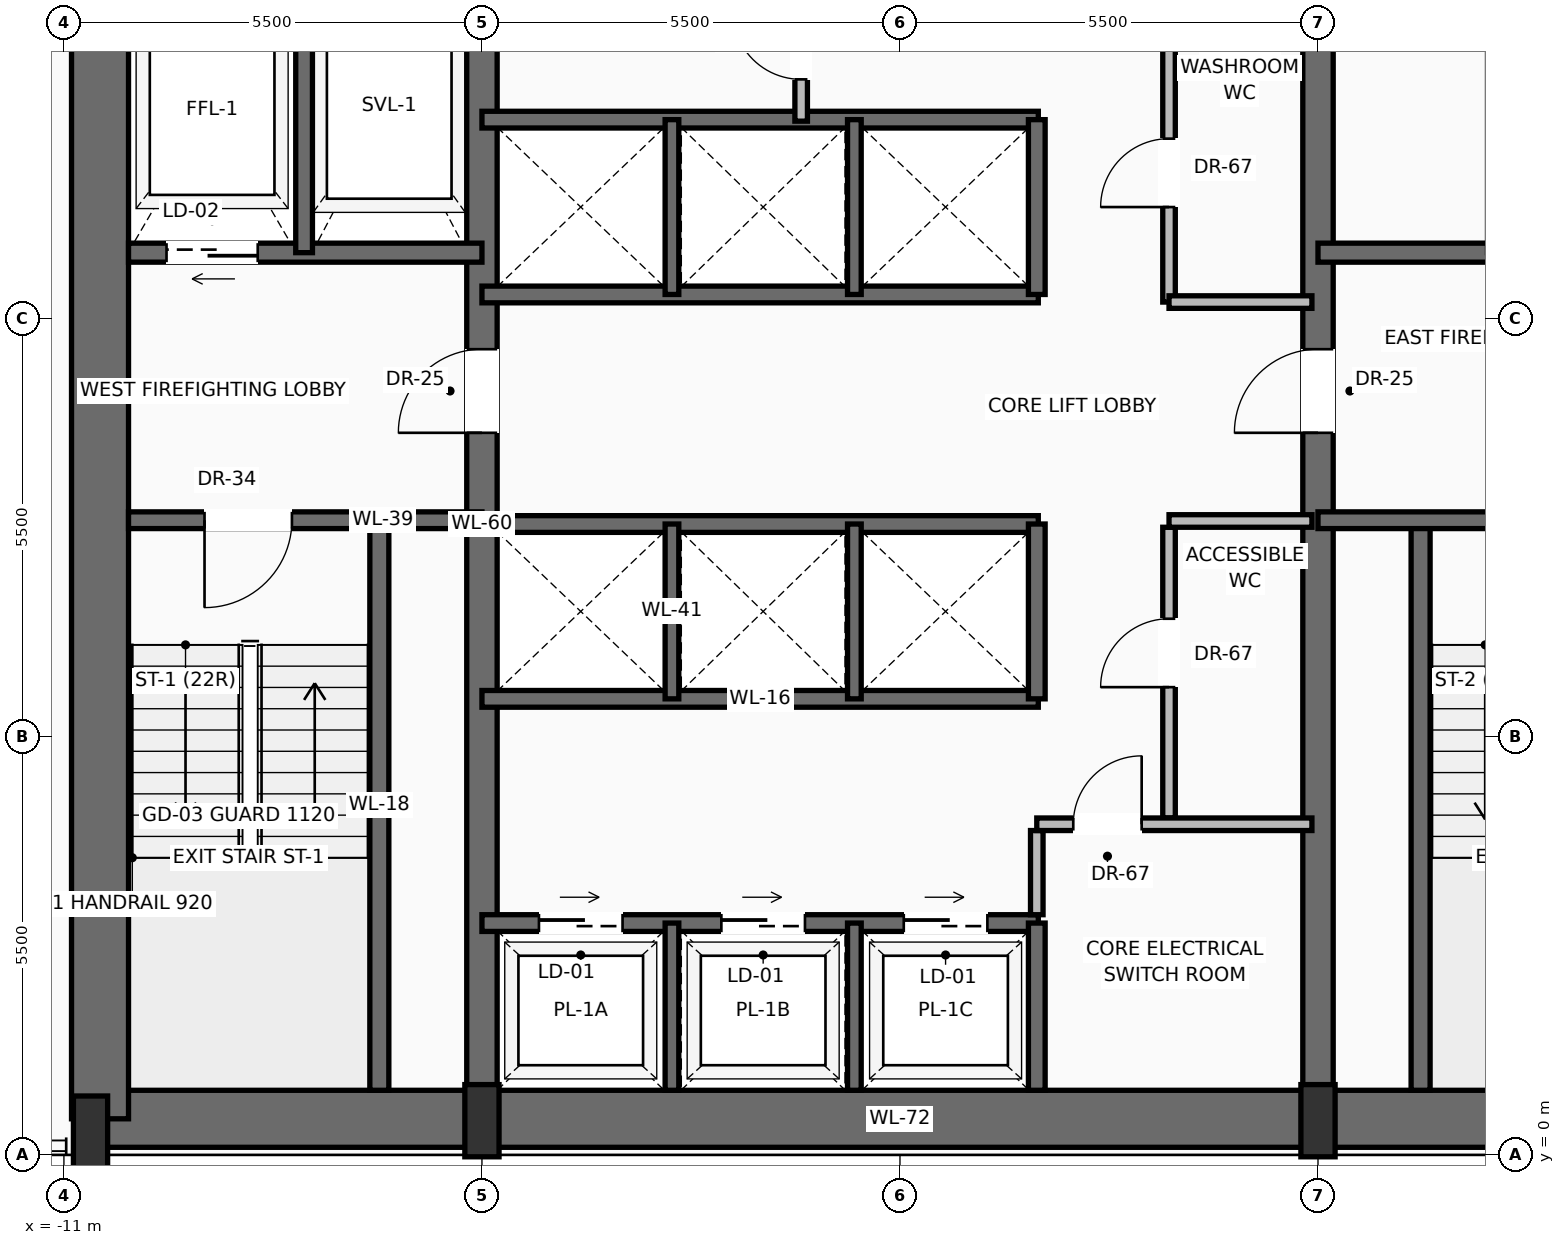
"""IFC4 building model, lengths in metres.
Left out: names, types, materials, properties, quantities, classifications, styles, units other than length and angle.
Written with IfcOpenShell. Run it as: python <this file> out.ifc"""

import sys

from ifc_helpers import new_model, si_unit, direction, frame, frame_2d, origin, origin_2d, place, context, subcontext, project, spatial, rectangle, extrude, source, transform, mapped, element, fill, save


model = new_model("IFC4")
c1 = context("Model", 3, precision=1e-05, world=origin(), true_north=direction((0.0, 1.0)))
c2 = subcontext(c1, "Body", "Model", "MODEL_VIEW")
j1 = project(units=[si_unit("LENGTHUNIT", "METRE"), si_unit("PLANEANGLEUNIT", "RADIAN")], contexts=[c1])
p1 = place(None, origin())
s1 = spatial("IfcSite", under=j1, at=p1, CompositionType="ELEMENT")
p2 = place(p1, origin())
s2 = spatial("IfcBuilding", under=s1, at=p2, CompositionType="ELEMENT")
p3 = place(p2, frame((0.0, 0.0, 109.9)))
s3 = spatial("IfcBuildingStorey", under=s2, at=p3, CompositionType="ELEMENT", Elevation=109.9)
p4 = place(p3, frame((-10.65, 0.475, 0.0), z_axis=(0.0, 0.0, 1.0), x_axis=(1.0, 0.0, 0.0)))
e1 = element("IfcWall", 1, at=p4, inside=s3, PredefinedType="SHEAR", context=c2, shape_type="SweptSolid", body=[
    extrude(rectangle(XDim=21.3, YDim=0.75, at=frame_2d((10.65, 0.0))), origin(), (0.0, 0.0, 1.0), 3.45),
])
p5 = place(p3, frame((-10.525, 0.475, 0.0), z_axis=(0.0, 0.0, 1.0), x_axis=(0.0, 1.0, 0.0)))
e2 = element("IfcWall", 2, at=p5, inside=s3, PredefinedType="SHEAR", context=c2, shape_type="SweptSolid", body=[
    extrude(rectangle(XDim=15.65, YDim=0.75, at=frame_2d((7.825, 0.0))), origin(), (0.0, 0.0, 1.0), 3.45),
])
p6 = place(p3, frame((-5.5, 0.475, 0.0), z_axis=(0.0, 0.0, 1.0), x_axis=(0.0, 1.0, 0.0)))
e3 = element("IfcWall", 3, at=p6, inside=s3, PredefinedType="SHEAR", context=c2, shape_type="SweptSolid", body=[
    extrude(rectangle(XDim=15.65, YDim=0.4, at=frame_2d((7.825, 0.0))), origin(), (0.0, 0.0, 1.0), 3.45),
])
p7 = place(p6, frame((9.025, 0.0, 0.0)))
e4 = element("IfcOpeningElement", 4, at=p7, cuts=e3, PredefinedType="OPENING", context=c2, shape_type="SweptSolid", body=[
    extrude(rectangle(XDim=1.1, YDim=2.2, at=frame_2d((0.55, 1.1))), frame((0.0, 0.21, 0.0), z_axis=(0.0, -1.0, 0.0), x_axis=(1.0, 0.0, 0.0)), (0.0, 0.0, 1.0), 0.42),
])
p8 = place(p3, frame((5.5, 0.475, 0.0), z_axis=(0.0, 0.0, 1.0), x_axis=(0.0, 1.0, 0.0)))
e5 = element("IfcWall", 5, at=p8, inside=s3, PredefinedType="SHEAR", context=c2, shape_type="SweptSolid", body=[
    extrude(rectangle(XDim=15.65, YDim=0.4, at=frame_2d((7.825, 0.0))), origin(), (0.0, 0.0, 1.0), 3.45),
])
p9 = place(p8, frame((9.025, 0.0, 0.0)))
e6 = element("IfcOpeningElement", 6, at=p9, cuts=e5, PredefinedType="OPENING", context=c2, shape_type="SweptSolid", body=[
    extrude(rectangle(XDim=1.1, YDim=2.2, at=frame_2d((0.55, 1.1))), frame((0.0, 0.21, 0.0), z_axis=(0.0, -1.0, 0.0), x_axis=(1.0, 0.0, 0.0)), (0.0, 0.0, 1.0), 0.42),
])
m1 = source(origin(), c2, "Body", "SweptSolid", [
    extrude(rectangle(XDim=0.45, YDim=0.95, at=origin_2d()), origin(), (0.0, 0.0, 1.0), 3.7),
])
for number, where, z_axis, x_axis in (
    (7, (-10.65, 0.3, 0.0), (0.0, 0.0, 1.0), (1.0, 0.0, 0.0)),
    (8, (-5.5, 0.45, 0.0), (0.0, 0.0, 1.0), (1.0, 0.0, 0.0)),
    (9, (5.5, 0.45, 0.0), (0.0, 0.0, 1.0), (1.0, 0.0, 0.0)),
):
    element("IfcColumn", number, at=place(p3, frame(where, z_axis=z_axis, x_axis=x_axis)), inside=s3, PredefinedType="PILASTER", context=c2, shape_type="MappedRepresentation", body=[
        mapped(m1, transform((0.0, 0.0, 0.0), scale=1.0)),
    ])
p10 = place(p3, frame((-6.85, 0.85, 0.0), z_axis=(0.0, 0.0, 1.0), x_axis=(0.0, 1.0, 0.0)))
e10 = element("IfcWall", 10, at=p10, inside=s3, PredefinedType="SOLIDWALL", context=c2, shape_type="SweptSolid", body=[
    extrude(rectangle(XDim=7.5, YDim=0.25, at=frame_2d((3.75, 0.0))), origin(), (0.0, 0.0, 1.0), 3.45),
])
p11 = place(p3, frame((-5.5, 8.35, 0.0), z_axis=(0.0, 0.0, 1.0), x_axis=(-1.0, 0.0, 0.0)))
e11 = element("IfcWall", 11, at=p11, inside=s3, PredefinedType="SOLIDWALL", context=c2, shape_type="SweptSolid", body=[
    extrude(rectangle(XDim=4.65, YDim=0.22, at=frame_2d((2.325, 0.0))), origin(), (0.0, 0.0, 1.0), 3.45),
])
p12 = place(p11, frame((2.5, 0.0, 0.0)))
e12 = element("IfcOpeningElement", 12, at=p12, cuts=e11, PredefinedType="OPENING", context=c2, shape_type="SweptSolid", body=[
    extrude(rectangle(XDim=1.15, YDim=2.2, at=frame_2d((0.575, 1.1))), frame((0.0, 0.12, 0.0), z_axis=(0.0, -1.0, 0.0), x_axis=(1.0, 0.0, 0.0)), (0.0, 0.0, 1.0), 0.24),
])
p13 = place(p3, frame((-5.5, 11.87, 0.0), z_axis=(0.0, 0.0, 1.0), x_axis=(-1.0, 0.0, 0.0)))
e13 = element("IfcWall", 13, at=p13, inside=s3, PredefinedType="SOLIDWALL", context=c2, shape_type="SweptSolid", body=[
    extrude(rectangle(XDim=4.65, YDim=0.25, at=frame_2d((2.325, 0.0))), origin(), (0.0, 0.0, 1.0), 3.45),
])
p14 = place(p13, frame((2.95, 0.0, 0.0)))
e14 = element("IfcOpeningElement", 14, at=p14, cuts=e13, PredefinedType="OPENING", context=c2, shape_type="SweptSolid", body=[
    extrude(rectangle(XDim=1.2, YDim=2.25, at=frame_2d((0.6, 1.125))), frame((0.0, 0.135, 0.0), z_axis=(0.0, -1.0, 0.0), x_axis=(1.0, 0.0, 0.0)), (0.0, 0.0, 1.0), 0.27),
])
p15 = place(p3, frame((-7.84, 11.87, 0.0), z_axis=(0.0, 0.0, 1.0), x_axis=(0.0, 1.0, 0.0)))
e15 = element("IfcWall", 15, at=p15, inside=s3, PredefinedType="SOLIDWALL", context=c2, shape_type="SweptSolid", body=[
    extrude(rectangle(XDim=3.88, YDim=0.22, at=frame_2d((1.94, 0.0))), origin(), (0.0, 0.0, 1.0), 3.45),
])
p16 = place(p3, frame((6.85, 0.85, 0.0), z_axis=(0.0, 0.0, 1.0), x_axis=(0.0, 1.0, 0.0)))
e16 = element("IfcWall", 16, at=p16, inside=s3, PredefinedType="SOLIDWALL", context=c2, shape_type="SweptSolid", body=[
    extrude(rectangle(XDim=7.5, YDim=0.25, at=frame_2d((3.75, 0.0))), origin(), (0.0, 0.0, 1.0), 3.45),
])
p17 = place(p3, frame((10.15, 8.35, 0.0), z_axis=(0.0, 0.0, 1.0), x_axis=(-1.0, 0.0, 0.0)))
e17 = element("IfcWall", 17, at=p17, inside=s3, PredefinedType="SOLIDWALL", context=c2, shape_type="SweptSolid", body=[
    extrude(rectangle(XDim=4.65, YDim=0.22, at=frame_2d((2.325, 0.0))), origin(), (0.0, 0.0, 1.0), 3.45),
])
p18 = place(p17, frame((1.0, 0.0, 0.0)))
e18 = element("IfcOpeningElement", 18, at=p18, cuts=e17, PredefinedType="OPENING", context=c2, shape_type="SweptSolid", body=[
    extrude(rectangle(XDim=1.15, YDim=2.2, at=frame_2d((0.575, 1.1))), frame((0.0, 0.12, 0.0), z_axis=(0.0, -1.0, 0.0), x_axis=(1.0, 0.0, 0.0)), (0.0, 0.0, 1.0), 0.24),
])
p19 = place(p3, frame((10.15, 11.87, 0.0), z_axis=(0.0, 0.0, 1.0), x_axis=(-1.0, 0.0, 0.0)))
e19 = element("IfcWall", 19, at=p19, inside=s3, PredefinedType="SOLIDWALL", context=c2, shape_type="SweptSolid", body=[
    extrude(rectangle(XDim=4.65, YDim=0.25, at=frame_2d((2.325, 0.0))), origin(), (0.0, 0.0, 1.0), 3.45),
])
p20 = place(p19, frame((0.5, 0.0, 0.0)))
e20 = element("IfcOpeningElement", 20, at=p20, cuts=e19, PredefinedType="OPENING", context=c2, shape_type="SweptSolid", body=[
    extrude(rectangle(XDim=1.2, YDim=2.25, at=frame_2d((0.6, 1.125))), frame((0.0, 0.135, 0.0), z_axis=(0.0, -1.0, 0.0), x_axis=(1.0, 0.0, 0.0)), (0.0, 0.0, 1.0), 0.27),
])
p21 = place(p3, frame((-5.5, 3.05, 0.0), z_axis=(0.0, 0.0, 1.0), x_axis=(1.0, 0.0, 0.0)))
e21 = element("IfcWall", 21, at=p21, inside=s3, PredefinedType="SOLIDWALL", context=c2, shape_type="SweptSolid", body=[
    extrude(rectangle(XDim=7.32, YDim=0.22, at=frame_2d((3.66, 0.0))), origin(), (0.0, 0.0, 1.0), 3.45),
])
p22 = place(p21, frame((0.75, 0.0, 0.0)))
e22 = element("IfcOpeningElement", 22, at=p22, cuts=e21, PredefinedType="OPENING", context=c2, shape_type="SweptSolid", body=[
    extrude(rectangle(XDim=1.1, YDim=2.2, at=frame_2d((0.55, 1.1))), frame((0.0, 0.12, 0.0), z_axis=(0.0, -1.0, 0.0), x_axis=(1.0, 0.0, 0.0)), (0.0, 0.0, 1.0), 0.24),
])
p23 = place(p21, frame((3.15, 0.0, 0.0)))
e23 = element("IfcOpeningElement", 23, at=p23, cuts=e21, PredefinedType="OPENING", context=c2, shape_type="SweptSolid", body=[
    extrude(rectangle(XDim=1.1, YDim=2.2, at=frame_2d((0.55, 1.1))), frame((0.0, 0.12, 0.0), z_axis=(0.0, -1.0, 0.0), x_axis=(1.0, 0.0, 0.0)), (0.0, 0.0, 1.0), 0.24),
])
p24 = place(p21, frame((5.55, 0.0, 0.0)))
e24 = element("IfcOpeningElement", 24, at=p24, cuts=e21, PredefinedType="OPENING", context=c2, shape_type="SweptSolid", body=[
    extrude(rectangle(XDim=1.1, YDim=2.2, at=frame_2d((0.55, 1.1))), frame((0.0, 0.12, 0.0), z_axis=(0.0, -1.0, 0.0), x_axis=(1.0, 0.0, 0.0)), (0.0, 0.0, 1.0), 0.24),
])
p25 = place(p3, frame((1.8, 0.85, 0.0), z_axis=(0.0, 0.0, 1.0), x_axis=(0.0, 1.0, 0.0)))
e25 = element("IfcWall", 25, at=p25, inside=s3, PredefinedType="SOLIDWALL", context=c2, shape_type="SweptSolid", body=[
    extrude(rectangle(XDim=2.2, YDim=0.22, at=frame_2d((1.1, 0.0))), origin(), (0.0, 0.0, 1.0), 3.45),
])
for number, where, z_axis, x_axis in (
    (26, (-3.0, 0.85, 0.0), (0.0, 0.0, 1.0), (0.0, 1.0, 0.0)),
    (27, (-0.6, 0.85, 0.0), (0.0, 0.0, 1.0), (0.0, 1.0, 0.0)),
):
    element("IfcWall", number, at=place(p3, frame(where, z_axis=z_axis, x_axis=x_axis)), inside=s3, PredefinedType="SOLIDWALL", context=c2, shape_type="SweptSolid", body=[
        extrude(rectangle(XDim=2.2, YDim=0.18, at=frame_2d((1.1, 0.0))), origin(), (0.0, 0.0, 1.0), 3.45),
    ])
p26 = place(p3, frame((1.8, 3.16, 0.0), z_axis=(0.0, 0.0, 1.0), x_axis=(0.0, 1.0, 0.0)))
e28 = element("IfcWall", 28, at=p26, inside=s3, PredefinedType="PARTITIONING", context=c2, shape_type="SweptSolid", body=[
    extrude(rectangle(XDim=1.108, YDim=0.165, at=frame_2d((0.554, 0.0))), origin(), (0.0, 0.0, 1.0), 3.442),
])
p27 = place(p3, frame((3.54, 4.433, 0.0), z_axis=(0.0, 0.0, 1.0), x_axis=(0.0, 1.0, 0.0)))
e29 = element("IfcWall", 29, at=p27, inside=s3, PredefinedType="PARTITIONING", context=c2, shape_type="SweptSolid", body=[
    extrude(rectangle(XDim=3.825, YDim=0.165, at=frame_2d((1.913, 0.0))), origin(), (0.0, 0.0, 1.0), 3.442),
])
p28 = place(p27, frame((1.721, 0.0, 0.0)))
e30 = element("IfcOpeningElement", 30, at=p28, cuts=e29, PredefinedType="OPENING", context=c2, shape_type="SweptSolid", body=[
    extrude(rectangle(XDim=0.9, YDim=2.1, at=frame_2d((0.45, 1.05))), frame((0.0, 0.093, 0.0), z_axis=(0.0, -1.0, 0.0), x_axis=(1.0, 0.0, 0.0)), (0.0, 0.0, 1.0), 0.185),
])
p29 = place(p3, frame((3.54, 8.34, 0.0), z_axis=(0.0, 0.0, 1.0), x_axis=(1.0, 0.0, 0.0)))
e31 = element("IfcWall", 31, at=p29, inside=s3, PredefinedType="PARTITIONING", context=c2, shape_type="SweptSolid", body=[
    extrude(rectangle(XDim=1.88, YDim=0.165, at=frame_2d((0.94, 0.0))), origin(), (0.0, 0.0, 1.0), 3.442),
])
p30 = place(p3, frame((1.8, 4.35, 0.0), z_axis=(0.0, 0.0, 1.0), x_axis=(1.0, 0.0, 0.0)))
e32 = element("IfcWall", 32, at=p30, inside=s3, PredefinedType="PARTITIONING", context=c2, shape_type="SweptSolid", body=[
    extrude(rectangle(XDim=3.62, YDim=0.165, at=frame_2d((1.81, 0.0))), origin(), (0.0, 0.0, 1.0), 3.442),
])
p31 = place(p30, frame((0.48, 0.0, 0.0)))
e33 = element("IfcOpeningElement", 33, at=p31, cuts=e32, PredefinedType="OPENING", context=c2, shape_type="SweptSolid", body=[
    extrude(rectangle(XDim=0.9, YDim=2.1, at=frame_2d((0.45, 1.05))), frame((0.0, 0.093, 0.0), z_axis=(0.0, -1.0, 0.0), x_axis=(1.0, 0.0, 0.0)), (0.0, 0.0, 1.0), 0.185),
])
for number, where, z_axis, x_axis in (
    (34, (-5.5, 6.0, 0.0), (0.0, 0.0, 1.0), (1.0, 0.0, 0.0)),
    (35, (-5.5, 8.3, 0.0), (0.0, 0.0, 1.0), (1.0, 0.0, 0.0)),
):
    element("IfcWall", number, at=place(p3, frame(where, z_axis=z_axis, x_axis=x_axis)), inside=s3, PredefinedType="SOLIDWALL", context=c2, shape_type="SweptSolid", body=[
        extrude(rectangle(XDim=7.32, YDim=0.22, at=frame_2d((3.66, 0.0))), origin(), (0.0, 0.0, 1.0), 3.45),
    ])
p32 = place(p3, frame((1.8, 6.0, 0.0), z_axis=(0.0, 0.0, 1.0), x_axis=(0.0, 1.0, 0.0)))
e36 = element("IfcWall", 36, at=p32, inside=s3, PredefinedType="SOLIDWALL", context=c2, shape_type="SweptSolid", body=[
    extrude(rectangle(XDim=2.3, YDim=0.22, at=frame_2d((1.15, 0.0))), origin(), (0.0, 0.0, 1.0), 3.45),
])
for number, where, z_axis, x_axis in (
    (37, (-3.0, 6.0, 0.0), (0.0, 0.0, 1.0), (0.0, 1.0, 0.0)),
    (38, (-0.6, 6.0, 0.0), (0.0, 0.0, 1.0), (0.0, 1.0, 0.0)),
):
    element("IfcWall", number, at=place(p3, frame(where, z_axis=z_axis, x_axis=x_axis)), inside=s3, PredefinedType="SOLIDWALL", context=c2, shape_type="SweptSolid", body=[
        extrude(rectangle(XDim=2.3, YDim=0.18, at=frame_2d((1.15, 0.0))), origin(), (0.0, 0.0, 1.0), 3.45),
    ])
for number, where, z_axis, x_axis in (
    (39, (-5.5, 11.32, 0.0), (0.0, 0.0, 1.0), (1.0, 0.0, 0.0)),
    (40, (-5.5, 13.62, 0.0), (0.0, 0.0, 1.0), (1.0, 0.0, 0.0)),
):
    element("IfcWall", number, at=place(p3, frame(where, z_axis=z_axis, x_axis=x_axis)), inside=s3, PredefinedType="SOLIDWALL", context=c2, shape_type="SweptSolid", body=[
        extrude(rectangle(XDim=7.32, YDim=0.22, at=frame_2d((3.66, 0.0))), origin(), (0.0, 0.0, 1.0), 3.45),
    ])
p33 = place(p3, frame((1.8, 11.32, 0.0), z_axis=(0.0, 0.0, 1.0), x_axis=(0.0, 1.0, 0.0)))
e41 = element("IfcWall", 41, at=p33, inside=s3, PredefinedType="SOLIDWALL", context=c2, shape_type="SweptSolid", body=[
    extrude(rectangle(XDim=2.3, YDim=0.22, at=frame_2d((1.15, 0.0))), origin(), (0.0, 0.0, 1.0), 3.45),
])
for number, where, z_axis, x_axis in (
    (42, (-3.0, 11.32, 0.0), (0.0, 0.0, 1.0), (0.0, 1.0, 0.0)),
    (43, (-0.6, 11.32, 0.0), (0.0, 0.0, 1.0), (0.0, 1.0, 0.0)),
):
    element("IfcWall", number, at=place(p3, frame(where, z_axis=z_axis, x_axis=x_axis)), inside=s3, PredefinedType="SOLIDWALL", context=c2, shape_type="SweptSolid", body=[
        extrude(rectangle(XDim=2.3, YDim=0.18, at=frame_2d((1.15, 0.0))), origin(), (0.0, 0.0, 1.0), 3.45),
    ])
p34 = place(p3, frame((-1.3, 13.6, 0.0), z_axis=(0.0, 0.0, 1.0), x_axis=(0.0, 1.0, 0.0)))
e44 = element("IfcWall", 44, at=p34, inside=s3, PredefinedType="PARTITIONING", context=c2, shape_type="SweptSolid", body=[
    extrude(rectangle(XDim=2.15, YDim=0.165, at=frame_2d((1.075, 0.0))), origin(), (0.0, 0.0, 1.0), 3.442),
])
p35 = place(p34, frame((0.55, 0.0, 0.0)))
e45 = element("IfcOpeningElement", 45, at=p35, cuts=e44, PredefinedType="OPENING", context=c2, shape_type="SweptSolid", body=[
    extrude(rectangle(XDim=0.9, YDim=2.1, at=frame_2d((0.45, 1.05))), frame((0.0, 0.093, 0.0), z_axis=(0.0, -1.0, 0.0), x_axis=(1.0, 0.0, 0.0)), (0.0, 0.0, 1.0), 0.185),
])
p36 = place(p3, frame((3.54, 11.22, 0.0), z_axis=(0.0, 0.0, 1.0), x_axis=(0.0, 1.0, 0.0)))
e46 = element("IfcWall", 46, at=p36, inside=s3, PredefinedType="PARTITIONING", context=c2, shape_type="SweptSolid", body=[
    extrude(rectangle(XDim=4.53, YDim=0.165, at=frame_2d((2.265, 0.0))), origin(), (0.0, 0.0, 1.0), 3.442),
])
p37 = place(p36, frame((1.25, 0.0, 0.0)))
e47 = element("IfcOpeningElement", 47, at=p37, cuts=e46, PredefinedType="OPENING", context=c2, shape_type="SweptSolid", body=[
    extrude(rectangle(XDim=0.9, YDim=2.1, at=frame_2d((0.45, 1.05))), frame((0.0, 0.093, 0.0), z_axis=(0.0, -1.0, 0.0), x_axis=(1.0, 0.0, 0.0)), (0.0, 0.0, 1.0), 0.185),
])
p38 = place(p3, frame((3.54, 11.22, 0.0), z_axis=(0.0, 0.0, 1.0), x_axis=(1.0, 0.0, 0.0)))
e48 = element("IfcWall", 48, at=p38, inside=s3, PredefinedType="PARTITIONING", context=c2, shape_type="SweptSolid", body=[
    extrude(rectangle(XDim=1.88, YDim=0.165, at=frame_2d((0.94, 0.0))), origin(), (0.0, 0.0, 1.0), 3.442),
])
m2 = source(origin(), c2, "Body", "SweptSolid", [
    extrude(rectangle(XDim=1.15, YDim=2.2, at=frame_2d((0.575, 1.1))), frame((0.0, 0.025, 0.0), z_axis=(0.0, -1.0, 0.0), x_axis=(1.0, 0.0, 0.0)), (0.0, 0.0, 1.0), 0.05),
])
p39 = place(p12, origin())
e49 = element("IfcDoor", 49, at=p39, inside=s3, OperationType="SINGLE_SWING_RIGHT", PredefinedType="DOOR", context=c2, shape_type="MappedRepresentation", body=[
    mapped(m2, transform((0.0, 0.0, 0.0), scale=1.0)),
])
fill(e12, e49)
m3 = source(origin(), c2, "Body", "SweptSolid", [
    extrude(rectangle(XDim=1.1, YDim=2.2, at=frame_2d((0.55, 1.1))), frame((0.0, 0.025, 0.0), z_axis=(0.0, -1.0, 0.0), x_axis=(1.0, 0.0, 0.0)), (0.0, 0.0, 1.0), 0.05),
])
p40 = place(p7, origin())
e50 = element("IfcDoor", 50, at=p40, inside=s3, OperationType="SINGLE_SWING_LEFT", PredefinedType="DOOR", context=c2, shape_type="MappedRepresentation", body=[
    mapped(m3, transform((0.0, 0.0, 0.0), scale=1.0)),
])
fill(e4, e50)
m4 = source(origin(), c2, "Body", "SweptSolid", [
    extrude(rectangle(XDim=1.2, YDim=2.25, at=frame_2d((0.6, 1.125))), frame((0.0, 0.025, 0.0), z_axis=(0.0, -1.0, 0.0), x_axis=(1.0, 0.0, 0.0)), (0.0, 0.0, 1.0), 0.05),
])
p41 = place(p14, origin())
e51 = element("IfcDoor", 51, at=p41, inside=s3, OperationType="SLIDING_TO_LEFT", PredefinedType="DOOR", context=c2, shape_type="MappedRepresentation", body=[
    mapped(m4, transform((0.0, 0.0, 0.0), scale=1.0)),
])
fill(e14, e51)
p42 = place(p9, origin())
e52 = element("IfcDoor", 52, at=p42, inside=s3, OperationType="SINGLE_SWING_LEFT", PredefinedType="DOOR", context=c2, shape_type="MappedRepresentation", body=[
    mapped(m3, transform((0.0, 0.0, 0.0), scale=1.0)),
])
fill(e6, e52)
m5 = source(origin(), c2, "Body", "SweptSolid", [
    extrude(rectangle(XDim=1.1, YDim=2.2, at=frame_2d((0.55, 1.1))), frame((0.0, 0.025, 0.0), z_axis=(0.0, -1.0, 0.0), x_axis=(1.0, 0.0, 0.0)), (0.0, 0.0, 1.0), 0.05),
])
p43 = place(p22, origin())
e53 = element("IfcDoor", 53, at=p43, inside=s3, OperationType="SLIDING_TO_RIGHT", PredefinedType="DOOR", context=c2, shape_type="MappedRepresentation", body=[
    mapped(m5, transform((0.0, 0.0, 0.0), scale=1.0)),
])
fill(e22, e53)
p44 = place(p23, origin())
e54 = element("IfcDoor", 54, at=p44, inside=s3, OperationType="SLIDING_TO_RIGHT", PredefinedType="DOOR", context=c2, shape_type="MappedRepresentation", body=[
    mapped(m5, transform((0.0, 0.0, 0.0), scale=1.0)),
])
fill(e23, e54)
p45 = place(p24, origin())
e55 = element("IfcDoor", 55, at=p45, inside=s3, OperationType="SLIDING_TO_RIGHT", PredefinedType="DOOR", context=c2, shape_type="MappedRepresentation", body=[
    mapped(m5, transform((0.0, 0.0, 0.0), scale=1.0)),
])
fill(e24, e55)
m6 = source(origin(), c2, "Body", "SweptSolid", [
    extrude(rectangle(XDim=0.9, YDim=2.1, at=frame_2d((0.45, 1.05))), frame((0.0, 0.025, 0.0), z_axis=(0.0, -1.0, 0.0), x_axis=(1.0, 0.0, 0.0)), (0.0, 0.0, 1.0), 0.05),
])
p46 = place(p31, origin())
e56 = element("IfcDoor", 56, at=p46, inside=s3, OperationType="SINGLE_SWING_RIGHT", PredefinedType="DOOR", context=c2, shape_type="MappedRepresentation", body=[
    mapped(m6, transform((0.0, 0.0, 0.0), scale=1.0)),
])
fill(e33, e56)
p47 = place(p28, origin())
e57 = element("IfcDoor", 57, at=p47, inside=s3, OperationType="SINGLE_SWING_LEFT", PredefinedType="DOOR", context=c2, shape_type="MappedRepresentation", body=[
    mapped(m6, transform((0.0, 0.0, 0.0), scale=1.0)),
])
fill(e30, e57)
p48 = place(p35, origin())
e58 = element("IfcDoor", 58, at=p48, inside=s3, OperationType="SINGLE_SWING_RIGHT", PredefinedType="DOOR", context=c2, shape_type="MappedRepresentation", body=[
    mapped(m6, transform((0.0, 0.0, 0.0), scale=1.0)),
])
fill(e45, e58)
p49 = place(p37, origin())
e59 = element("IfcDoor", 59, at=p49, inside=s3, OperationType="SINGLE_SWING_LEFT", PredefinedType="DOOR", context=c2, shape_type="MappedRepresentation", body=[
    mapped(m6, transform((0.0, 0.0, 0.0), scale=1.0)),
])
fill(e47, e59)
save(model, sys.argv[1])
